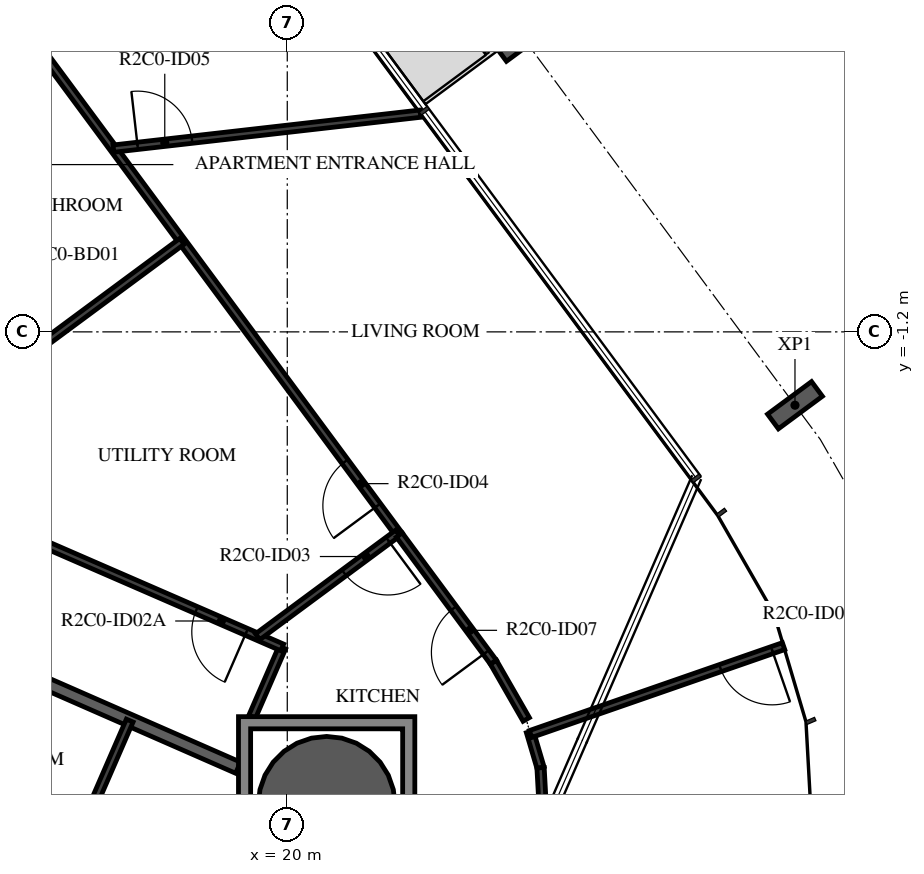
"""IFC4 building model, lengths in metres.
Left out: names, types, materials, properties, quantities, classifications, styles, units other than length and angle.
Written with IfcOpenShell. Run it as: python <this file> out.ifc"""

import sys

from ifc_helpers import new_model, si_unit, direction, frame, frame_2d, origin, origin_2d, place, context, subcontext, project, spatial, polyline, rectangle, hollow_circle, i_section, outline, extrude, element, fill, save


model = new_model("IFC4")
c1 = context("Model", 3, precision=1e-05, world=origin(), true_north=direction((0.0, 1.0)))
c2 = subcontext(c1, "Body", "Model", "MODEL_VIEW")
j1 = project(units=[si_unit("LENGTHUNIT", "METRE"), si_unit("PLANEANGLEUNIT", "RADIAN")], contexts=[c1])
p1 = place(None, origin())
s1 = spatial("IfcSite", under=j1, at=p1, CompositionType="ELEMENT")
p2 = place(p1, origin())
s2 = spatial("IfcBuilding", under=s1, at=p2, CompositionType="ELEMENT")
p3 = place(p2, frame((0.0, 0.0, 104.7)))
s3 = spatial("IfcBuildingStorey", under=s2, at=p3, CompositionType="ELEMENT", Elevation=104.7)
p4 = place(p3, frame((20.648, -8.978, -0.38), z_axis=(0.0, 0.0, 1.0), x_axis=(1.0, 0.0, 0.0)))
e1 = element("IfcColumn", 1, at=p4, inside=s3, PredefinedType="COLUMN", context=c2, shape_type="SweptSolid", body=[
    extrude(hollow_circle(Radius=1.125, WallThickness=0.055, at=origin_2d()), origin(), (0.0, 0.0, 1.0), 2.616),
])
for number, where, z_axis, x_axis in (
    (2, (28.349, -2.406, -0.38), (0.0, 0.0, 1.0), (0.595, -0.804, 0.0)),
    (3, (23.877, 3.638, -0.38), (0.0, 0.0, 1.0), (0.595, -0.804, 0.0)),
):
    element("IfcColumn", number, at=place(p3, frame(where, z_axis=z_axis, x_axis=x_axis)), inside=s3, PredefinedType="COLUMN", context=c2, shape_type="SweptSolid", body=[
        extrude(i_section(OverallWidth=0.3, OverallDepth=0.9, WebThickness=0.019, FlangeThickness=0.035, FilletRadius=0.03, at=origin_2d()), origin(), (0.0, 0.0, 1.0), 2.616),
    ])
p5 = place(p3, frame((12.564, -5.463, 0.0), z_axis=(0.0, 0.0, 1.0), x_axis=(0.915914014963, -0.401374534812, 0.0)))
e4 = element("IfcWall", 4, at=p5, inside=s3, PredefinedType="STANDARD", context=c2, shape_type="SweptSolid", body=[
    extrude(rectangle(XDim=7.236, YDim=0.2, at=frame_2d((3.618, 0.0))), origin(), (0.0, 0.0, 1.0), 3.05),
])
p6 = place(p3, frame((19.423, -7.528, 0.0), z_axis=(0.0, 0.0, 1.0), x_axis=(0.398733304334, 0.917066928863, 0.0)))
e5 = element("IfcWall", 5, at=p6, inside=s3, PredefinedType="PARTITIONING", context=c2, shape_type="SweptSolid", body=[
    extrude(rectangle(XDim=1.241, YDim=0.12, at=frame_2d((0.621, 0.0))), origin(), (0.0, 0.0, 1.0), 3.05),
])
p7 = place(p3, frame((19.918, -6.39, 0.0), z_axis=(0.0, 0.0, 1.0), x_axis=(-0.917051386612, 0.39876904884, 0.0)))
e6 = element("IfcWall", 6, at=p7, inside=s3, PredefinedType="PARTITIONING", context=c2, shape_type="SweptSolid", body=[
    extrude(rectangle(XDim=5.614, YDim=0.12, at=frame_2d((2.807, 0.0))), origin(), (0.0, 0.0, 1.0), 3.05),
])
p8 = place(p7, frame((0.641, 0.0, 0.0)))
e7 = element("IfcOpeningElement", 7, at=p8, cuts=e6, PredefinedType="OPENING", context=c2, shape_type="SweptSolid", body=[
    extrude(rectangle(XDim=0.9, YDim=2.0, at=frame_2d((0.45, 1.0))), frame((0.0, 0.07, 0.0), z_axis=(0.0, -1.0, 0.0), x_axis=(1.0, 0.0, 0.0)), (0.0, 0.0, 1.0), 0.14),
])
p9 = place(p3, frame((21.842, -4.54, 0.0), z_axis=(0.0, 0.0, 1.0), x_axis=(-0.59481744951, 0.803860809941, 0.0)))
e8 = element("IfcWall", 8, at=p9, inside=s3, PredefinedType="PARTITIONING", context=c2, shape_type="SweptSolid", body=[
    extrude(rectangle(XDim=11.976, YDim=0.12, at=frame_2d((5.988, 0.0))), origin(), (0.0, 0.0, 1.0), 3.05),
])
p10 = place(p9, frame((0.6, 0.0, 0.0)))
e9 = element("IfcOpeningElement", 9, at=p10, cuts=e8, PredefinedType="OPENING", context=c2, shape_type="SweptSolid", body=[
    extrude(rectangle(XDim=0.9, YDim=2.1, at=frame_2d((0.45, 1.05))), frame((0.0, 0.07, 0.0), z_axis=(0.0, -1.0, 0.0), x_axis=(1.0, 0.0, 0.0)), (0.0, 0.0, 1.0), 0.14),
])
p11 = place(p3, frame((15.499, -1.76, 0.0), z_axis=(0.0, 0.0, 1.0), x_axis=(0.803852063114, 0.59482927015, 0.0)))
e10 = element("IfcWall", 10, at=p11, inside=s3, PredefinedType="PARTITIONING", context=c2, shape_type="SweptSolid", body=[
    extrude(rectangle(XDim=3.446, YDim=0.12, at=frame_2d((1.723, 0.0))), origin(), (0.0, 0.0, 1.0), 3.05),
])
p12 = place(p3, frame((17.141, 1.814, 0.0), z_axis=(0.0, 0.0, 1.0), x_axis=(0.993575814944, 0.113168458319, 0.0)))
e11 = element("IfcWall", 11, at=p12, inside=s3, PredefinedType="PARTITIONING", context=c2, shape_type="SweptSolid", body=[
    extrude(rectangle(XDim=5.081, YDim=0.12, at=frame_2d((2.54, 0.0))), origin(), (0.0, 0.0, 1.0), 3.05),
])
p13 = place(p12, frame((0.4, 0.0, 0.0)))
e12 = element("IfcOpeningElement", 12, at=p13, cuts=e11, PredefinedType="OPENING", context=c2, shape_type="SweptSolid", body=[
    extrude(rectangle(XDim=0.9, YDim=2.1, at=frame_2d((0.45, 1.05))), frame((0.0, 0.07, 0.0), z_axis=(0.0, -1.0, 0.0), x_axis=(1.0, 0.0, 0.0)), (0.0, 0.0, 1.0), 0.14),
])
p14 = place(p3, frame((23.99, -7.775, 0.0), z_axis=(0.0, 0.0, 1.0), x_axis=(0.284088329691, -0.958798112708, 0.0)))
e13 = element("IfcWall", 13, at=p14, inside=s3, PredefinedType="PARTITIONING", context=c2, shape_type="SweptSolid", body=[
    extrude(rectangle(XDim=0.619, YDim=0.12, at=frame_2d((0.309, 0.0))), origin(), (0.0, 0.0, 1.0), 3.05),
])
p15 = place(p3, frame((24.165, -8.368, 0.0), z_axis=(0.0, 0.0, 1.0), x_axis=(0.055078507089, -0.998482026907, 0.0)))
e14 = element("IfcWall", 14, at=p15, inside=s3, PredefinedType="PARTITIONING", context=c2, shape_type="SweptSolid", body=[
    extrude(rectangle(XDim=0.829, YDim=0.12, at=frame_2d((0.415, 0.0))), origin(), (0.0, 0.0, 1.0), 3.05),
])
p16 = place(p3, frame((28.162, -6.368, 0.0), z_axis=(0.0, 0.0, 1.0), x_axis=(-0.94463429878, -0.328125039534, 0.0)))
e15 = element("IfcWall", 15, at=p16, inside=s3, PredefinedType="PARTITIONING", context=c2, shape_type="SweptSolid", body=[
    extrude(rectangle(XDim=4.405, YDim=0.12, at=frame_2d((2.202, 0.0))), origin(), (0.0, 0.0, 1.0), 3.05),
])
p17 = place(p16, frame((0.2, 0.0, 0.0)))
e16 = element("IfcOpeningElement", 16, at=p17, cuts=e15, PredefinedType="OPENING", context=c2, shape_type="SweptSolid", body=[
    extrude(rectangle(XDim=0.9, YDim=2.1, at=frame_2d((0.45, 1.05))), frame((0.0, 0.07, 0.0), z_axis=(0.0, -1.0, 0.0), x_axis=(1.0, 0.0, 0.0)), (0.0, 0.0, 1.0), 0.14),
])
p18 = place(p3, frame((21.818, -4.508, 0.0), z_axis=(0.0, 0.0, 1.0), x_axis=(-0.803875276339, -0.594797898526, 0.0)))
e17 = element("IfcWall", 17, at=p18, inside=s3, PredefinedType="PARTITIONING", context=c2, shape_type="SweptSolid", body=[
    extrude(rectangle(XDim=2.868, YDim=0.12, at=frame_2d((1.434, 0.0))), origin(), (0.0, 0.0, 1.0), 3.05),
])
p19 = place(p18, frame((0.2, 0.0, 0.0)))
e18 = element("IfcOpeningElement", 18, at=p19, cuts=e17, PredefinedType="OPENING", context=c2, shape_type="SweptSolid", body=[
    extrude(rectangle(XDim=0.9, YDim=2.1, at=frame_2d((0.45, 1.05))), frame((0.0, 0.07, 0.0), z_axis=(0.0, -1.0, 0.0), x_axis=(1.0, 0.0, 0.0)), (0.0, 0.0, 1.0), 0.14),
])
p20 = place(p3, frame((23.93, -7.573, 0.0), z_axis=(0.0, 0.0, 1.0), x_axis=(-0.497348044937, 0.867551106389, 0.0)))
e19 = element("IfcWall", 19, at=p20, inside=s3, PredefinedType="PARTITIONING", context=c2, shape_type="SweptSolid", body=[
    extrude(rectangle(XDim=1.087, YDim=0.12, at=frame_2d((0.543, 0.0))), origin(), (0.0, 0.0, 1.0), 3.05),
])
p21 = place(p3, frame((23.389, -6.631, 0.0), z_axis=(0.0, 0.0, 1.0), x_axis=(-0.594821170528, 0.803858056557, 0.0)))
e20 = element("IfcWall", 20, at=p21, inside=s3, PredefinedType="PARTITIONING", context=c2, shape_type="SweptSolid", body=[
    extrude(rectangle(XDim=2.601, YDim=0.12, at=frame_2d((1.301, 0.0))), origin(), (0.0, 0.0, 1.0), 3.05),
])
p22 = place(p21, frame((0.2, 0.0, 0.0)))
e21 = element("IfcOpeningElement", 21, at=p22, cuts=e20, PredefinedType="OPENING", context=c2, shape_type="SweptSolid", body=[
    extrude(rectangle(XDim=0.9, YDim=2.1, at=frame_2d((0.45, 1.05))), frame((0.0, 0.07, 0.0), z_axis=(0.0, -1.0, 0.0), x_axis=(1.0, 0.0, 0.0)), (0.0, 0.0, 1.0), 0.14),
])
p23 = place(p3, frame((15.686, -11.556, 0.0), z_axis=(0.0, 0.0, 1.0), x_axis=(0.398740569839, 0.917063769846, 0.0)))
e22 = element("IfcWall", 22, at=p23, inside=s3, PredefinedType="PARTITIONING", context=c2, shape_type="SweptSolid", body=[
    extrude(rectangle(XDim=4.322, YDim=0.12, at=frame_2d((2.161, 0.0))), origin(), (0.0, 0.0, 1.0), 3.05),
])
p24 = place(p23, frame((1.1, 0.0, 0.0)))
e23 = element("IfcOpeningElement", 23, at=p24, cuts=e22, PredefinedType="OPENING", context=c2, shape_type="SweptSolid", body=[
    extrude(rectangle(XDim=0.9, YDim=2.1, at=frame_2d((0.45, 1.05))), frame((0.0, 0.07, 0.0), z_axis=(0.0, -1.0, 0.0), x_axis=(1.0, 0.0, 0.0)), (0.0, 0.0, 1.0), 0.14),
])
p25 = place(p3, origin())
e24 = element("IfcWall", 24, at=p25, inside=s3, PredefinedType="STANDARD", context=c2, shape_type="SweptSolid", body=[
    extrude(outline(polyline([(22.098, -7.528), (22.098, -10.428), (19.198, -10.428), (19.198, -7.528), (22.098, -7.528)]), holes=[polyline([(19.398, -10.228), (21.898, -10.228), (21.898, -7.728), (19.398, -7.728), (19.398, -10.228)])]), origin(), (0.0, 0.0, 1.0), 3.05),
])
p26 = place(p8, origin())
e25 = element("IfcDoor", 25, at=p26, inside=s3, OperationType="SINGLE_SWING_LEFT", PredefinedType="DOOR", context=c2, shape_type="SweptSolid", body=[
    extrude(rectangle(XDim=0.9, YDim=2.0, at=frame_2d((0.45, 1.0))), frame((0.0, 0.025, 0.0), z_axis=(0.0, -1.0, 0.0), x_axis=(1.0, 0.0, 0.0)), (0.0, 0.0, 1.0), 0.05),
])
fill(e7, e25)
p27 = place(p19, origin())
e26 = element("IfcDoor", 26, at=p27, inside=s3, OperationType="SINGLE_SWING_LEFT", PredefinedType="DOOR", context=c2, shape_type="SweptSolid", body=[
    extrude(rectangle(XDim=0.9, YDim=2.1, at=frame_2d((0.45, 1.05))), frame((0.0, 0.025, 0.0), z_axis=(0.0, -1.0, 0.0), x_axis=(1.0, 0.0, 0.0)), (0.0, 0.0, 1.0), 0.05),
])
fill(e18, e26)
p28 = place(p10, origin())
e27 = element("IfcDoor", 27, at=p28, inside=s3, OperationType="SINGLE_SWING_LEFT", PredefinedType="DOOR", context=c2, shape_type="SweptSolid", body=[
    extrude(rectangle(XDim=0.9, YDim=2.1, at=frame_2d((0.45, 1.05))), frame((0.0, 0.025, 0.0), z_axis=(0.0, -1.0, 0.0), x_axis=(1.0, 0.0, 0.0)), (0.0, 0.0, 1.0), 0.05),
])
fill(e9, e27)
p29 = place(p13, origin())
e28 = element("IfcDoor", 28, at=p29, inside=s3, OperationType="SINGLE_SWING_LEFT", PredefinedType="DOOR", context=c2, shape_type="SweptSolid", body=[
    extrude(rectangle(XDim=0.9, YDim=2.1, at=frame_2d((0.45, 1.05))), frame((0.0, 0.025, 0.0), z_axis=(0.0, -1.0, 0.0), x_axis=(1.0, 0.0, 0.0)), (0.0, 0.0, 1.0), 0.05),
])
fill(e12, e28)
p30 = place(p17, origin())
e29 = element("IfcDoor", 29, at=p30, inside=s3, OperationType="SINGLE_SWING_LEFT", PredefinedType="DOOR", context=c2, shape_type="SweptSolid", body=[
    extrude(rectangle(XDim=0.9, YDim=2.1, at=frame_2d((0.45, 1.05))), frame((0.0, 0.025, 0.0), z_axis=(0.0, -1.0, 0.0), x_axis=(1.0, 0.0, 0.0)), (0.0, 0.0, 1.0), 0.05),
])
fill(e16, e29)
p31 = place(p22, origin())
e30 = element("IfcDoor", 30, at=p31, inside=s3, OperationType="SINGLE_SWING_RIGHT", PredefinedType="DOOR", context=c2, shape_type="SweptSolid", body=[
    extrude(rectangle(XDim=0.9, YDim=2.1, at=frame_2d((0.45, 1.05))), frame((0.0, 0.025, 0.0), z_axis=(0.0, -1.0, 0.0), x_axis=(1.0, 0.0, 0.0)), (0.0, 0.0, 1.0), 0.05),
])
fill(e21, e30)
save(model, sys.argv[1])
